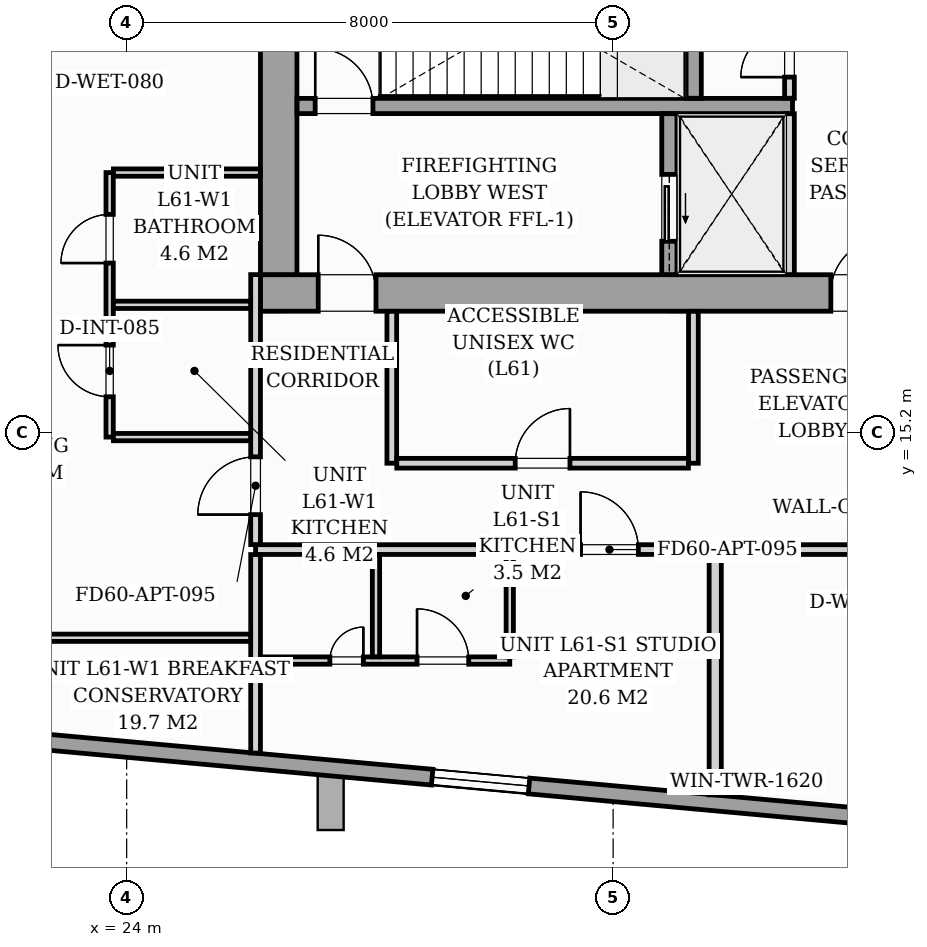
"""IFC4 building model, lengths in metres.
Left out: names, types, materials, properties, quantities, classifications, styles, units other than length and angle.
Written with IfcOpenShell. Run it as: python <this file> out.ifc"""

import sys

from ifc_helpers import new_model, si_unit, direction, frame, frame_2d, origin, origin_2d, place, context, subcontext, project, spatial, rectangle, i_section, extrude, source, transform, mapped, element, fill, save


model = new_model("IFC4")
c1 = context("Model", 3, precision=1e-05, world=origin(), true_north=direction((0.0, 1.0)))
c2 = subcontext(c1, "Body", "Model", "MODEL_VIEW")
j1 = project(units=[si_unit("LENGTHUNIT", "METRE"), si_unit("PLANEANGLEUNIT", "RADIAN")], contexts=[c1])
p1 = place(None, origin())
s1 = spatial("IfcSite", under=j1, at=p1, CompositionType="ELEMENT")
p2 = place(p1, origin())
s2 = spatial("IfcBuilding", under=s1, at=p2, CompositionType="ELEMENT")
p3 = place(p2, frame((0.0, 0.0, 211.4)))
s3 = spatial("IfcBuildingStorey", under=s2, at=p3, CompositionType="ELEMENT", Elevation=211.4)
m1 = source(origin(), c2, "Body", "SweptSolid", [
    extrude(i_section(OverallWidth=0.409, OverallDepth=0.425, WebThickness=0.033, FlangeThickness=0.052, FilletRadius=0.018, at=origin_2d()), origin(), (0.0, 0.0, 1.0), 5.196),
])
for number, where, z_axis, x_axis in (
    (1, (26.4, 17.4, 0.002), (0.0, 0.0, 1.0), (1.0, 0.0, 0.0)),
    (2, (33.12, 17.4, 0.002), (0.0, 0.0, 1.0), (1.0, 0.0, 0.0)),
):
    element("IfcColumn", number, at=place(p3, frame(where, z_axis=z_axis, x_axis=x_axis)), inside=s3, PredefinedType="PILASTER", context=c2, shape_type="MappedRepresentation", body=[
        mapped(m1, transform((0.0, 0.0, 0.0), scale=1.0)),
    ])
m2 = source(origin(), c2, "Body", "SweptSolid", [
    extrude(i_section(OverallWidth=0.427, OverallDepth=0.976, WebThickness=0.031, FlangeThickness=0.056, FilletRadius=0.024, at=origin_2d()), origin(), (0.0, 0.0, 1.0), 8.072),
])
p4 = place(p3, frame((28.796, 8.577, 0.191), z_axis=(-0.778187748082, 0.312466773891, 0.544782841092), x_axis=(0.50555077301, -0.202994482334, 0.838577161656)))
e3 = element("IfcColumn", 3, at=p4, inside=s3, PredefinedType="COLUMN", context=c2, shape_type="MappedRepresentation", body=[
    mapped(m2, transform((0.0, 0.0, 0.0), scale=1.0)),
])
m3 = source(origin(), c2, "Body", "SweptSolid", [
    extrude(i_section(OverallWidth=0.427, OverallDepth=0.976, WebThickness=0.031, FlangeThickness=0.056, FilletRadius=0.024, at=origin_2d()), origin(), (0.0, 0.0, 1.0), 8.487),
])
p5 = place(p3, frame((39.648, 9.549, 0.195), z_axis=(-0.85149277394, 0.086009371105, 0.51726438502), x_axis=(0.514645573214, -0.051984401335, 0.855825657473)))
e4 = element("IfcColumn", 4, at=p5, inside=s3, PredefinedType="COLUMN", context=c2, shape_type="MappedRepresentation", body=[
    mapped(m3, transform((0.0, 0.0, 0.0), scale=1.0)),
])
p6 = place(p3, frame((42.761, 8.287, 0.0), z_axis=(0.0, 0.0, 1.0), x_axis=(-0.995884956798, 0.090626446601, 0.0)))
e5 = element("IfcWall", 5, at=p6, inside=s3, PredefinedType="STANDARD", context=c2, shape_type="SweptSolid", body=[
    extrude(rectangle(XDim=21.6, YDim=0.26, at=frame_2d((10.8, 0.0))), origin(), (0.0, 0.0, 1.0), 4.78),
])
p7 = place(p6, frame((12.194, 0.0, 0.75)))
e6 = element("IfcOpeningElement", 6, at=p7, cuts=e5, PredefinedType="OPENING", context=c2, shape_type="SweptSolid", body=[
    extrude(rectangle(XDim=1.6, YDim=1.5, at=frame_2d((0.8, 0.75))), frame((0.0, 0.14, 0.0), z_axis=(0.0, -1.0, 0.0), x_axis=(1.0, 0.0, 0.0)), (0.0, 0.0, 1.0), 0.28),
])
p8 = place(p3, frame((26.2, 17.5, 0.0), z_axis=(0.0, 0.0, 1.0), x_axis=(1.0, 0.0, 0.0)))
e7 = element("IfcWall", 7, at=p8, inside=s3, PredefinedType="SHEAR", context=c2, shape_type="SweptSolid", body=[
    extrude(rectangle(XDim=19.6, YDim=0.6, at=frame_2d((9.8, 0.0))), origin(), (0.0, 0.0, 1.0), 5.2),
])
p9 = place(p8, frame((0.95, 0.0, 0.0)))
e8 = element("IfcOpeningElement", 8, at=p9, cuts=e7, PredefinedType="OPENING", context=c2, shape_type="SweptSolid", body=[
    extrude(rectangle(XDim=0.95, YDim=2.06, at=frame_2d((0.475, 1.03))), frame((0.0, 0.31, 0.0), z_axis=(0.0, -1.0, 0.0), x_axis=(1.0, 0.0, 0.0)), (0.0, 0.0, 1.0), 0.62),
])
p10 = place(p8, frame((9.38, 0.0, 0.0)))
e9 = element("IfcOpeningElement", 9, at=p10, cuts=e7, PredefinedType="OPENING", context=c2, shape_type="SweptSolid", body=[
    extrude(rectangle(XDim=0.9, YDim=2.06, at=frame_2d((0.45, 1.03))), frame((0.0, 0.31, 0.0), z_axis=(0.0, -1.0, 0.0), x_axis=(1.0, 0.0, 0.0)), (0.0, 0.0, 1.0), 0.62),
])
p11 = place(p8, frame((17.55, 0.0, 0.0)))
e10 = element("IfcOpeningElement", 10, at=p11, cuts=e7, PredefinedType="OPENING", context=c2, shape_type="SweptSolid", body=[
    extrude(rectangle(XDim=0.95, YDim=2.06, at=frame_2d((0.475, 1.03))), frame((0.0, 0.31, 0.0), z_axis=(0.0, -1.0, 0.0), x_axis=(1.0, 0.0, 0.0)), (0.0, 0.0, 1.0), 0.62),
])
p12 = place(p3, frame((26.5, 17.802, 0.0), z_axis=(0.0, 0.0, 1.0), x_axis=(0.0, 1.0, 0.0)))
e11 = element("IfcWall", 11, at=p12, inside=s3, PredefinedType="SHEAR", context=c2, shape_type="SweptSolid", body=[
    extrude(rectangle(XDim=5.796, YDim=0.6, at=frame_2d((2.898, 0.0))), origin(), (0.0, 0.0, 1.0), 5.2),
])
p13 = place(p3, frame((26.802, 20.575, 0.0), z_axis=(0.0, 0.0, 1.0), x_axis=(1.0, 0.0, 0.0)))
e12 = element("IfcWall", 12, at=p13, inside=s3, PredefinedType="SOLIDWALL", context=c2, shape_type="SweptSolid", body=[
    extrude(rectangle(XDim=8.148, YDim=0.25, at=frame_2d((4.074, 0.0))), origin(), (0.0, 0.0, 1.0), 5.2),
])
p14 = place(p13, frame((0.298, 0.0, 0.0)))
e13 = element("IfcOpeningElement", 13, at=p14, cuts=e12, PredefinedType="OPENING", context=c2, shape_type="SweptSolid", body=[
    extrude(rectangle(XDim=0.95, YDim=2.06, at=frame_2d((0.475, 1.03))), frame((0.0, 0.135, 0.0), z_axis=(0.0, -1.0, 0.0), x_axis=(1.0, 0.0, 0.0)), (0.0, 0.0, 1.0), 0.27),
])
p15 = place(p3, frame((33.325, 20.702, 0.0), z_axis=(0.0, 0.0, 1.0), x_axis=(0.0, 1.0, 0.0)))
e14 = element("IfcWall", 14, at=p15, inside=s3, PredefinedType="SOLIDWALL", context=c2, shape_type="SweptSolid", body=[
    extrude(rectangle(XDim=2.896, YDim=0.25, at=frame_2d((1.448, 0.0))), origin(), (0.0, 0.0, 1.0), 5.2),
])
p16 = place(p3, frame((32.925, 17.802, 0.0), z_axis=(0.0, 0.0, 1.0), x_axis=(0.0, 1.0, 0.0)))
e15 = element("IfcWall", 15, at=p16, inside=s3, PredefinedType="SOLIDWALL", context=c2, shape_type="SweptSolid", body=[
    extrude(rectangle(XDim=2.646, YDim=0.25, at=frame_2d((1.323, 0.0))), origin(), (0.0, 0.0, 1.0), 5.2),
])
p17 = place(p16, frame((0.548, 0.0, 0.0)))
e16 = element("IfcOpeningElement", 16, at=p17, cuts=e15, PredefinedType="OPENING", context=c2, shape_type="SweptSolid", body=[
    extrude(rectangle(XDim=1.1, YDim=2.08, at=frame_2d((0.55, 1.04))), frame((0.0, 0.135, 0.0), z_axis=(0.0, -1.0, 0.0), x_axis=(1.0, 0.0, 0.0)), (0.0, 0.0, 1.0), 0.27),
])
p18 = place(p3, frame((34.9, 17.802, 0.0), z_axis=(0.0, 0.0, 1.0), x_axis=(0.0, 1.0, 0.0)))
e17 = element("IfcWall", 17, at=p18, inside=s3, PredefinedType="PARTITIONING", context=c2, shape_type="SweptSolid", body=[
    extrude(rectangle(XDim=2.646, YDim=0.16, at=frame_2d((1.323, 0.0))), origin(), (0.0, 0.0, 1.0), 4.78),
])
p19 = place(p3, frame((34.9, 20.702, 0.0), z_axis=(0.0, 0.0, 1.0), x_axis=(0.0, 1.0, 0.0)))
e18 = element("IfcWall", 18, at=p19, inside=s3, PredefinedType="PARTITIONING", context=c2, shape_type="SweptSolid", body=[
    extrude(rectangle(XDim=2.896, YDim=0.16, at=frame_2d((1.448, 0.0))), origin(), (0.0, 0.0, 1.0), 4.78),
])
p20 = place(p19, frame((0.348, 0.0, 0.0)))
e19 = element("IfcOpeningElement", 19, at=p20, cuts=e18, PredefinedType="OPENING", context=c2, shape_type="SweptSolid", body=[
    extrude(rectangle(XDim=0.8, YDim=2.05, at=frame_2d((0.4, 1.025))), frame((0.0, 0.09, 0.0), z_axis=(0.0, -1.0, 0.0), x_axis=(1.0, 0.0, 0.0)), (0.0, 0.0, 1.0), 0.18),
])
p21 = place(p3, frame((26.12, 13.28, 0.0), z_axis=(0.0, 0.0, 1.0), x_axis=(1.0, 0.0, 0.0)))
e20 = element("IfcWall", 20, at=p21, inside=s3, PredefinedType="PARTITIONING", context=c2, shape_type="SweptSolid", body=[
    extrude(rectangle(XDim=19.76, YDim=0.16, at=frame_2d((9.88, 0.0))), origin(), (0.0, 0.0, 1.0), 4.345),
])
p22 = place(p21, frame((5.345, 0.0, 0.0)))
e21 = element("IfcOpeningElement", 21, at=p22, cuts=e20, PredefinedType="OPENING", context=c2, shape_type="SweptSolid", body=[
    extrude(rectangle(XDim=0.95, YDim=2.06, at=frame_2d((0.475, 1.03))), frame((0.0, 0.09, 0.0), z_axis=(0.0, -1.0, 0.0), x_axis=(1.0, 0.0, 0.0)), (0.0, 0.0, 1.0), 0.18),
])
p23 = place(p21, frame((16.52, 0.0, 0.0)))
e22 = element("IfcOpeningElement", 22, at=p23, cuts=e20, PredefinedType="OPENING", context=c2, shape_type="SweptSolid", body=[
    extrude(rectangle(XDim=0.95, YDim=2.06, at=frame_2d((0.475, 1.03))), frame((0.0, 0.09, 0.0), z_axis=(0.0, -1.0, 0.0), x_axis=(1.0, 0.0, 0.0)), (0.0, 0.0, 1.0), 0.18),
])
p24 = place(p3, frame((26.12, 9.934, 0.0), z_axis=(0.0, 0.0, 1.0), x_axis=(0.0, 1.0, 0.0)))
e23 = element("IfcWall", 23, at=p24, inside=s3, PredefinedType="PARTITIONING", context=c2, shape_type="SweptSolid", body=[
    extrude(rectangle(XDim=3.264, YDim=0.16, at=frame_2d((1.632, 0.0))), origin(), (0.0, 0.0, 1.0), 4.78),
])
p25 = place(p3, frame((26.12, 13.362, 0.0), z_axis=(0.0, 0.0, 1.0), x_axis=(0.0, 1.0, 0.0)))
e24 = element("IfcWall", 24, at=p25, inside=s3, PredefinedType="PARTITIONING", context=c2, shape_type="SweptSolid", body=[
    extrude(rectangle(XDim=4.44, YDim=0.16, at=frame_2d((2.22, 0.0))), origin(), (0.0, 0.0, 1.0), 4.78),
])
p26 = place(p25, frame((0.493, 0.0, 0.0)))
e25 = element("IfcOpeningElement", 25, at=p26, cuts=e24, PredefinedType="OPENING", context=c2, shape_type="SweptSolid", body=[
    extrude(rectangle(XDim=0.95, YDim=2.06, at=frame_2d((0.475, 1.03))), frame((0.0, 0.09, 0.0), z_axis=(0.0, -1.0, 0.0), x_axis=(1.0, 0.0, 0.0)), (0.0, 0.0, 1.0), 0.18),
])
p27 = place(p3, frame((26.202, 11.455, 0.0), z_axis=(0.0, 0.0, 1.0), x_axis=(1.0, 0.0, 0.0)))
e26 = element("IfcWall", 26, at=p27, inside=s3, PredefinedType="PARTITIONING", context=c2, shape_type="SweptSolid", body=[
    extrude(rectangle(XDim=4.098, YDim=0.12, at=frame_2d((2.049, 0.0))), origin(), (0.0, 0.0, 1.0), 4.345),
])
p28 = place(p27, frame((1.14, 0.0, 0.0)))
e27 = element("IfcOpeningElement", 27, at=p28, cuts=e26, PredefinedType="OPENING", context=c2, shape_type="SweptSolid", body=[
    extrude(rectangle(XDim=0.55, YDim=2.0, at=frame_2d((0.275, 1.0))), frame((0.0, 0.07, 0.0), z_axis=(0.0, -1.0, 0.0), x_axis=(1.0, 0.0, 0.0)), (0.0, 0.0, 1.0), 0.14),
])
p29 = place(p27, frame((2.573, 0.0, 0.0)))
e28 = element("IfcOpeningElement", 28, at=p29, cuts=e26, PredefinedType="OPENING", context=c2, shape_type="SweptSolid", body=[
    extrude(rectangle(XDim=0.85, YDim=2.05, at=frame_2d((0.425, 1.025))), frame((0.0, 0.07, 0.0), z_axis=(0.0, -1.0, 0.0), x_axis=(1.0, 0.0, 0.0)), (0.0, 0.0, 1.0), 0.14),
])
for number, where, z_axis, x_axis in (
    (29, (30.3, 11.517, 0.0), (0.0, 0.0, 1.0), (0.0, 1.0, 0.0)),
    (30, (28.1, 11.517, 0.0), (0.0, 0.0, 1.0), (0.0, 1.0, 0.0)),
):
    element("IfcWall", number, at=place(p3, frame(where, z_axis=z_axis, x_axis=x_axis)), inside=s3, PredefinedType="PARTITIONING", context=c2, shape_type="SweptSolid", body=[
        extrude(rectangle(XDim=1.681, YDim=0.12, at=frame_2d((0.84, 0.0))), origin(), (0.0, 0.0, 1.0), 4.78),
    ])
p30 = place(p3, frame((33.679, 9.246, 0.0), z_axis=(0.0, 0.0, 1.0), x_axis=(0.0, 1.0, 0.0)))
e31 = element("IfcWall", 31, at=p30, inside=s3, PredefinedType="PARTITIONING", context=c2, shape_type="SweptSolid", body=[
    extrude(rectangle(XDim=3.952, YDim=0.2, at=frame_2d((1.976, 0.0))), origin(), (0.0, 0.0, 1.0), 4.78),
])
p31 = place(p3, frame((23.72, 15.13, 0.0), z_axis=(0.0, 0.0, 1.0), x_axis=(0.0, 1.0, 0.0)))
e32 = element("IfcWall", 32, at=p31, inside=s3, PredefinedType="PARTITIONING", context=c2, shape_type="SweptSolid", body=[
    extrude(rectangle(XDim=4.35, YDim=0.12, at=frame_2d((2.175, 0.0))), origin(), (0.0, 0.0, 1.0), 4.78),
])
p32 = place(p31, frame((0.663, 0.0, 0.0)))
e33 = element("IfcOpeningElement", 33, at=p32, cuts=e32, PredefinedType="OPENING", context=c2, shape_type="SweptSolid", body=[
    extrude(rectangle(XDim=0.85, YDim=2.05, at=frame_2d((0.425, 1.025))), frame((0.0, 0.07, 0.0), z_axis=(0.0, -1.0, 0.0), x_axis=(1.0, 0.0, 0.0)), (0.0, 0.0, 1.0), 0.14),
])
p33 = place(p31, frame((2.862, 0.0, 0.0)))
e34 = element("IfcOpeningElement", 34, at=p33, cuts=e32, PredefinedType="OPENING", context=c2, shape_type="SweptSolid", body=[
    extrude(rectangle(XDim=0.8, YDim=2.02, at=frame_2d((0.4, 1.01))), frame((0.0, 0.07, 0.0), z_axis=(0.0, -1.0, 0.0), x_axis=(1.0, 0.0, 0.0)), (0.0, 0.0, 1.0), 0.14),
])
p34 = place(p3, frame((23.782, 17.305, 0.0), z_axis=(0.0, 0.0, 1.0), x_axis=(1.0, 0.0, 0.0)))
e35 = element("IfcWall", 35, at=p34, inside=s3, PredefinedType="PARTITIONING", context=c2, shape_type="SweptSolid", body=[
    extrude(rectangle(XDim=2.256, YDim=0.12, at=frame_2d((1.128, 0.0))), origin(), (0.0, 0.0, 1.0), 4.122),
])
p35 = place(p3, frame((23.782, 15.13, 0.0), z_axis=(0.0, 0.0, 1.0), x_axis=(1.0, 0.0, 0.0)))
e36 = element("IfcWall", 36, at=p35, inside=s3, PredefinedType="PARTITIONING", context=c2, shape_type="SweptSolid", body=[
    extrude(rectangle(XDim=2.256, YDim=0.12, at=frame_2d((1.128, 0.0))), origin(), (0.0, 0.0, 1.0), 4.78),
])
p36 = place(p3, frame((23.782, 19.48, 0.0), z_axis=(0.0, 0.0, 1.0), x_axis=(1.0, 0.0, 0.0)))
e37 = element("IfcWall", 37, at=p36, inside=s3, PredefinedType="PARTITIONING", context=c2, shape_type="SweptSolid", body=[
    extrude(rectangle(XDim=2.416, YDim=0.12, at=frame_2d((1.208, 0.0))), origin(), (0.0, 0.0, 1.0), 4.78),
])
p37 = place(p3, frame((11.515, 11.83, 0.0), z_axis=(0.0, 0.0, 1.0), x_axis=(1.0, 0.0, 0.0)))
e38 = element("IfcWall", 38, at=p37, inside=s3, PredefinedType="PARTITIONING", context=c2, shape_type="SweptSolid", body=[
    extrude(rectangle(XDim=14.523, YDim=0.12, at=frame_2d((7.261, 0.0))), origin(), (0.0, 0.0, 1.0), 3.814),
])
p38 = place(p37, frame((8.207, 0.0, 0.0)))
e39 = element("IfcOpeningElement", 39, at=p38, cuts=e38, PredefinedType="OPENING", context=c2, shape_type="SweptSolid", body=[
    extrude(rectangle(XDim=0.85, YDim=2.05, at=frame_2d((0.425, 1.025))), frame((0.0, 0.07, 0.0), z_axis=(0.0, -1.0, 0.0), x_axis=(1.0, 0.0, 0.0)), (0.0, 0.0, 1.0), 0.14),
])
for number, where, z_axis, x_axis in (
    (40, (28.36, 14.7, 0.0), (0.0, 0.0, 1.0), (0.0, 1.0, 0.0)),
    (41, (33.32, 14.7, 0.0), (0.0, 0.0, 1.0), (0.0, 1.0, 0.0)),
):
    element("IfcWall", number, at=place(p3, frame(where, z_axis=z_axis, x_axis=x_axis)), inside=s3, PredefinedType="PARTITIONING", context=c2, shape_type="SweptSolid", body=[
        extrude(rectangle(XDim=2.498, YDim=0.16, at=frame_2d((1.249, 0.0))), origin(), (0.0, 0.0, 1.0), 4.78),
    ])
p39 = place(p3, frame((28.442, 14.7, 0.0), z_axis=(0.0, 0.0, 1.0), x_axis=(1.0, 0.0, 0.0)))
e42 = element("IfcWall", 42, at=p39, inside=s3, PredefinedType="PARTITIONING", context=c2, shape_type="SweptSolid", body=[
    extrude(rectangle(XDim=4.796, YDim=0.16, at=frame_2d((2.398, 0.0))), origin(), (0.0, 0.0, 1.0), 4.345),
])
p40 = place(p39, frame((1.948, 0.0, 0.0)))
e43 = element("IfcOpeningElement", 43, at=p40, cuts=e42, PredefinedType="OPENING", context=c2, shape_type="SweptSolid", body=[
    extrude(rectangle(XDim=0.9, YDim=2.05, at=frame_2d((0.45, 1.025))), frame((0.0, 0.09, 0.0), z_axis=(0.0, -1.0, 0.0), x_axis=(1.0, 0.0, 0.0)), (0.0, 0.0, 1.0), 0.18),
])
m4 = source(origin(), c2, "Body", "SweptSolid", [
    extrude(rectangle(XDim=1.6, YDim=1.5, at=frame_2d((0.8, 0.75))), frame((0.0, 0.03, 0.0), z_axis=(0.0, -1.0, 0.0), x_axis=(1.0, 0.0, 0.0)), (0.0, 0.0, 1.0), 0.06),
])
p41 = place(p7, origin())
e44 = element("IfcWindow", 44, at=p41, inside=s3, PartitioningType="SINGLE_PANEL", PredefinedType="WINDOW", context=c2, shape_type="MappedRepresentation", body=[
    mapped(m4, transform((0.0, 0.0, 0.0), scale=1.0)),
])
fill(e6, e44)
m5 = source(origin(), c2, "Body", "SweptSolid", [
    extrude(rectangle(XDim=0.95, YDim=2.06, at=frame_2d((0.475, 1.03))), frame((0.0, 0.025, 0.0), z_axis=(0.0, -1.0, 0.0), x_axis=(1.0, 0.0, 0.0)), (0.0, 0.0, 1.0), 0.05),
])
p42 = place(p9, origin())
e45 = element("IfcDoor", 45, at=p42, inside=s3, OperationType="SINGLE_SWING_LEFT", PredefinedType="DOOR", context=c2, shape_type="MappedRepresentation", body=[
    mapped(m5, transform((0.0, 0.0, 0.0), scale=1.0)),
])
fill(e8, e45)
m6 = source(origin(), c2, "Body", "SweptSolid", [
    extrude(rectangle(XDim=0.9, YDim=2.06, at=frame_2d((0.45, 1.03))), frame((0.0, 0.025, 0.0), z_axis=(0.0, -1.0, 0.0), x_axis=(1.0, 0.0, 0.0)), (0.0, 0.0, 1.0), 0.05),
])
p43 = place(p10, origin())
e46 = element("IfcDoor", 46, at=p43, inside=s3, OperationType="SINGLE_SWING_RIGHT", PredefinedType="DOOR", context=c2, shape_type="MappedRepresentation", body=[
    mapped(m6, transform((0.0, 0.0, 0.0), scale=1.0)),
])
fill(e9, e46)
p44 = place(p14, origin())
e47 = element("IfcDoor", 47, at=p44, inside=s3, OperationType="SINGLE_SWING_LEFT", PredefinedType="DOOR", context=c2, shape_type="MappedRepresentation", body=[
    mapped(m5, transform((0.0, 0.0, 0.0), scale=1.0)),
])
fill(e13, e47)
m7 = source(origin(), c2, "Body", "SweptSolid", [
    extrude(rectangle(XDim=1.1, YDim=2.08, at=frame_2d((0.55, 1.04))), frame((0.0, 0.025, 0.0), z_axis=(0.0, -1.0, 0.0), x_axis=(1.0, 0.0, 0.0)), (0.0, 0.0, 1.0), 0.05),
])
p45 = place(p17, origin())
e48 = element("IfcDoor", 48, at=p45, inside=s3, OperationType="SLIDING_TO_LEFT", PredefinedType="DOOR", context=c2, shape_type="MappedRepresentation", body=[
    mapped(m7, transform((0.0, 0.0, 0.0), scale=1.0)),
])
fill(e16, e48)
m8 = source(origin(), c2, "Body", "SweptSolid", [
    extrude(rectangle(XDim=0.8, YDim=2.05, at=frame_2d((0.4, 1.025))), frame((0.0, 0.025, 0.0), z_axis=(0.0, -1.0, 0.0), x_axis=(1.0, 0.0, 0.0)), (0.0, 0.0, 1.0), 0.05),
])
p46 = place(p20, origin())
e49 = element("IfcDoor", 49, at=p46, inside=s3, OperationType="SINGLE_SWING_LEFT", PredefinedType="DOOR", context=c2, shape_type="MappedRepresentation", body=[
    mapped(m8, transform((0.0, 0.0, 0.0), scale=1.0)),
])
fill(e19, e49)
m9 = source(origin(), c2, "Body", "SweptSolid", [
    extrude(rectangle(XDim=0.95, YDim=2.06, at=frame_2d((0.475, 1.03))), frame((0.0, 0.025, 0.0), z_axis=(0.0, -1.0, 0.0), x_axis=(1.0, 0.0, 0.0)), (0.0, 0.0, 1.0), 0.05),
])
p47 = place(p22, origin())
e50 = element("IfcDoor", 50, at=p47, inside=s3, OperationType="SINGLE_SWING_LEFT", PredefinedType="DOOR", context=c2, shape_type="MappedRepresentation", body=[
    mapped(m9, transform((0.0, 0.0, 0.0), scale=1.0)),
])
fill(e21, e50)
m10 = source(origin(), c2, "Body", "SweptSolid", [
    extrude(rectangle(XDim=0.55, YDim=2.0, at=frame_2d((0.275, 1.0))), frame((0.0, 0.025, 0.0), z_axis=(0.0, -1.0, 0.0), x_axis=(1.0, 0.0, 0.0)), (0.0, 0.0, 1.0), 0.05),
])
p48 = place(p28, origin())
e51 = element("IfcDoor", 51, at=p48, inside=s3, OperationType="SINGLE_SWING_RIGHT", PredefinedType="DOOR", context=c2, shape_type="MappedRepresentation", body=[
    mapped(m10, transform((0.0, 0.0, 0.0), scale=1.0)),
])
fill(e27, e51)
m11 = source(origin(), c2, "Body", "SweptSolid", [
    extrude(rectangle(XDim=0.85, YDim=2.05, at=frame_2d((0.425, 1.025))), frame((0.0, 0.025, 0.0), z_axis=(0.0, -1.0, 0.0), x_axis=(1.0, 0.0, 0.0)), (0.0, 0.0, 1.0), 0.05),
])
p49 = place(p29, origin())
e52 = element("IfcDoor", 52, at=p49, inside=s3, OperationType="SINGLE_SWING_LEFT", PredefinedType="DOOR", context=c2, shape_type="MappedRepresentation", body=[
    mapped(m11, transform((0.0, 0.0, 0.0), scale=1.0)),
])
fill(e28, e52)
p50 = place(p26, origin())
e53 = element("IfcDoor", 53, at=p50, inside=s3, OperationType="SINGLE_SWING_LEFT", PredefinedType="DOOR", context=c2, shape_type="MappedRepresentation", body=[
    mapped(m9, transform((0.0, 0.0, 0.0), scale=1.0)),
])
fill(e25, e53)
p51 = place(p32, origin())
e54 = element("IfcDoor", 54, at=p51, inside=s3, OperationType="SINGLE_SWING_RIGHT", PredefinedType="DOOR", context=c2, shape_type="MappedRepresentation", body=[
    mapped(m11, transform((0.0, 0.0, 0.0), scale=1.0)),
])
fill(e33, e54)
m12 = source(origin(), c2, "Body", "SweptSolid", [
    extrude(rectangle(XDim=0.8, YDim=2.02, at=frame_2d((0.4, 1.01))), frame((0.0, 0.025, 0.0), z_axis=(0.0, -1.0, 0.0), x_axis=(1.0, 0.0, 0.0)), (0.0, 0.0, 1.0), 0.05),
])
p52 = place(p33, origin())
e55 = element("IfcDoor", 55, at=p52, inside=s3, OperationType="SINGLE_SWING_LEFT", PredefinedType="DOOR", context=c2, shape_type="MappedRepresentation", body=[
    mapped(m12, transform((0.0, 0.0, 0.0), scale=1.0)),
])
fill(e34, e55)
m13 = source(origin(), c2, "Body", "SweptSolid", [
    extrude(rectangle(XDim=0.9, YDim=2.05, at=frame_2d((0.45, 1.025))), frame((0.0, 0.025, 0.0), z_axis=(0.0, -1.0, 0.0), x_axis=(1.0, 0.0, 0.0)), (0.0, 0.0, 1.0), 0.05),
])
p53 = place(p40, origin())
e56 = element("IfcDoor", 56, at=p53, inside=s3, OperationType="SINGLE_SWING_RIGHT", PredefinedType="DOOR", context=c2, shape_type="MappedRepresentation", body=[
    mapped(m13, transform((0.0, 0.0, 0.0), scale=1.0)),
])
fill(e43, e56)
save(model, sys.argv[1])
